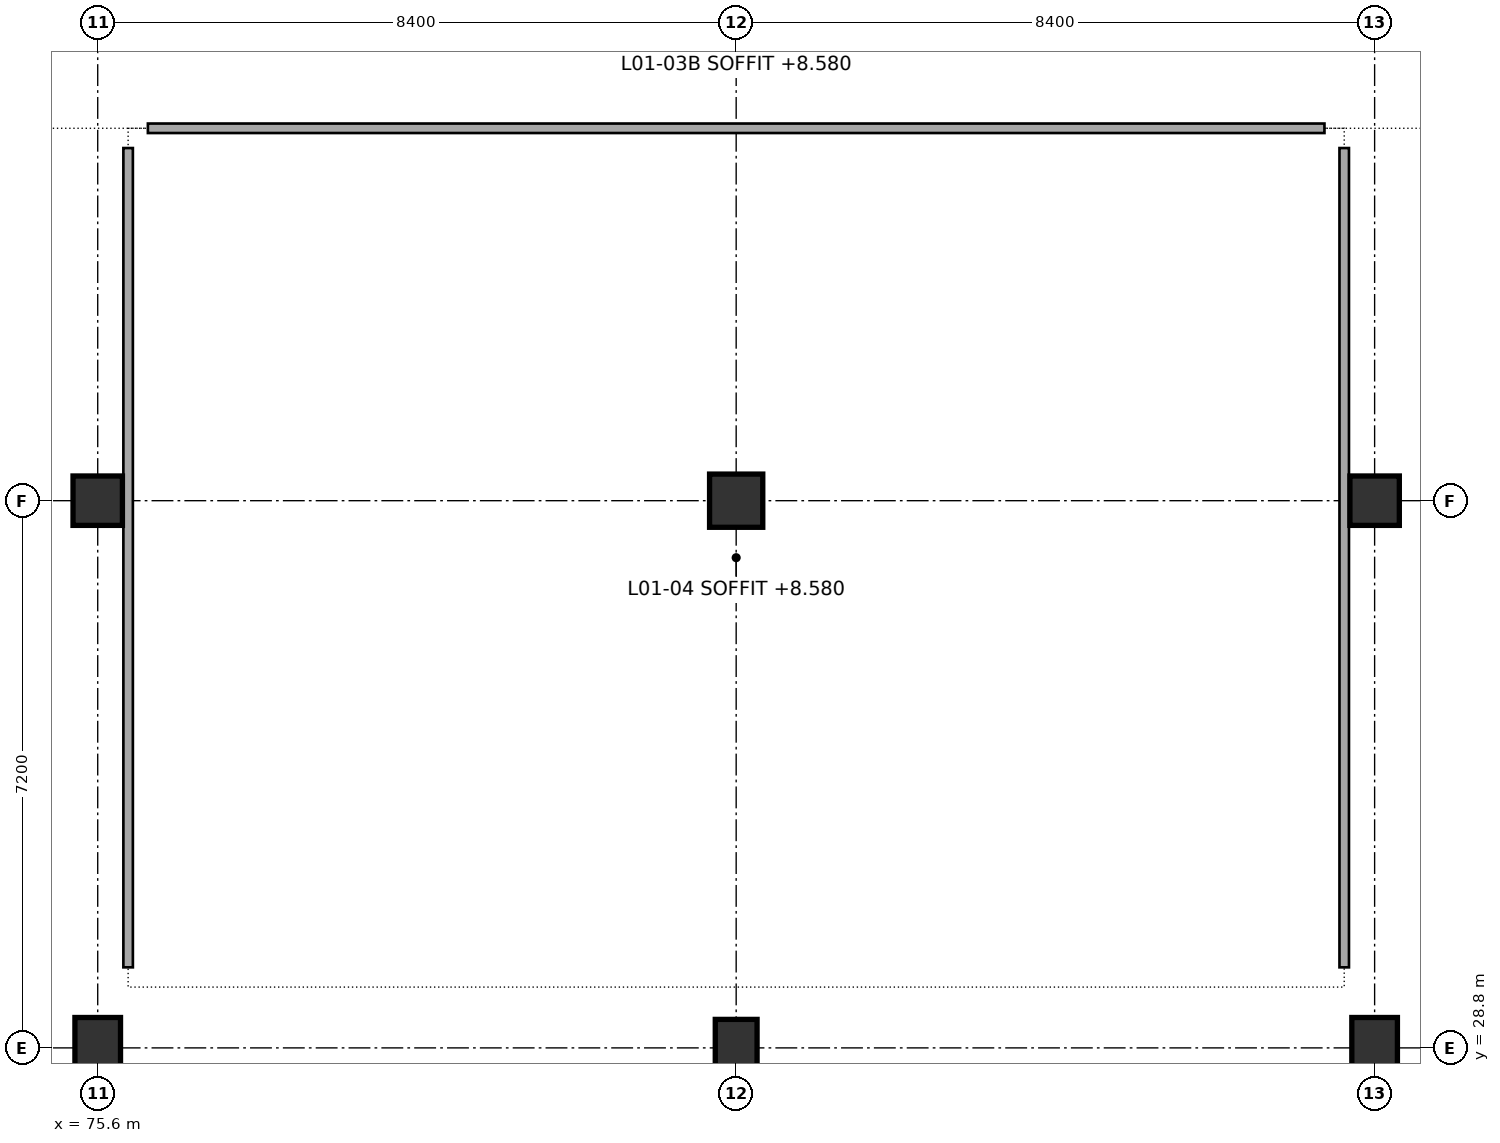
"""IFC4 building model, lengths in metres.
Left out: names, types, materials, properties, quantities, classifications, styles, units other than length and angle.
Written with IfcOpenShell. Run it as: python <this file> out.ifc"""

import sys

from ifc_helpers import new_model, si_unit, direction, frame, frame_2d, origin, origin_2d, place, context, subcontext, project, spatial, rectangle, extrude, element, fill, save


model = new_model("IFC4")
c1 = context("Model", 3, precision=1e-05, world=origin(), true_north=direction((0.0, 1.0)))
c2 = subcontext(c1, "Body", "Model", "MODEL_VIEW")
j1 = project(units=[si_unit("LENGTHUNIT", "METRE"), si_unit("PLANEANGLEUNIT", "RADIAN")], contexts=[c1])
p1 = place(None, origin())
s1 = spatial("IfcSite", under=j1, at=p1, CompositionType="ELEMENT")
p2 = place(p1, origin())
s2 = spatial("IfcBuilding", under=s1, at=p2, CompositionType="ELEMENT")
p3 = place(p2, frame((0.0, 0.0, 4.8)))
s3 = spatial("IfcBuildingStorey", under=s2, at=p3, CompositionType="ELEMENT", Elevation=4.8)
p4 = place(p3, frame((75.6, 28.8, 0.0), z_axis=(0.0, 0.0, 1.0), x_axis=(1.0, 0.0, 0.0)))
e1 = element("IfcColumn", 1, at=p4, inside=s3, PredefinedType="COLUMN", context=c2, shape_type="SweptSolid", body=[
    extrude(rectangle(XDim=0.6, YDim=0.8, at=origin_2d()), origin(), (0.0, 0.0, 1.0), 4.2),
])
p5 = place(p3, frame((75.6, 36.0, 0.0), z_axis=(0.0, 0.0, 1.0), x_axis=(1.0, 0.0, 0.0)))
e2 = element("IfcColumn", 2, at=p5, inside=s3, PredefinedType="COLUMN", context=c2, shape_type="SweptSolid", body=[
    extrude(rectangle(XDim=0.65, YDim=0.65, at=origin_2d()), origin(), (0.0, 0.0, 1.0), 4.2),
])
p6 = place(p3, frame((84.0, 28.8, 0.0), z_axis=(0.0, 0.0, 1.0), x_axis=(1.0, 0.0, 0.0)))
e3 = element("IfcColumn", 3, at=p6, inside=s3, PredefinedType="COLUMN", context=c2, shape_type="SweptSolid", body=[
    extrude(rectangle(XDim=0.55, YDim=0.75, at=origin_2d()), origin(), (0.0, 0.0, 1.0), 4.2),
])
p7 = place(p3, frame((84.0, 36.0, 0.0), z_axis=(0.0, 0.0, 1.0), x_axis=(1.0, 0.0, 0.0)))
e4 = element("IfcColumn", 4, at=p7, inside=s3, PredefinedType="COLUMN", context=c2, shape_type="SweptSolid", body=[
    extrude(rectangle(XDim=0.7, YDim=0.7, at=origin_2d()), origin(), (0.0, 0.0, 1.0), 4.2),
])
p8 = place(p3, frame((92.4, 28.8, 0.0), z_axis=(0.0, 0.0, 1.0), x_axis=(1.0, 0.0, 0.0)))
e5 = element("IfcColumn", 5, at=p8, inside=s3, PredefinedType="COLUMN", context=c2, shape_type="SweptSolid", body=[
    extrude(rectangle(XDim=0.6, YDim=0.8, at=origin_2d()), origin(), (0.0, 0.0, 1.0), 4.2),
])
p9 = place(p3, frame((92.4, 36.0, 0.0), z_axis=(0.0, 0.0, 1.0), x_axis=(1.0, 0.0, 0.0)))
e6 = element("IfcColumn", 6, at=p9, inside=s3, PredefinedType="COLUMN", context=c2, shape_type="SweptSolid", body=[
    extrude(rectangle(XDim=0.65, YDim=0.65, at=origin_2d()), origin(), (0.0, 0.0, 1.0), 4.2),
])
p10 = place(p3, frame((92.0, 29.86, 0.0), z_axis=(0.0, 0.0, 1.0), x_axis=(0.0, 1.0, 0.0)))
e7 = element("IfcWall", 7, at=p10, inside=s3, PredefinedType="PARTITIONING", context=c2, shape_type="SweptSolid", body=[
    extrude(rectangle(XDim=10.78, YDim=0.125, at=frame_2d((5.39, 0.0))), origin(), (0.0, 0.0, 1.0), 2.765),
])
p11 = place(p3, frame((91.74, 40.9, 0.0), z_axis=(0.0, 0.0, 1.0), x_axis=(-1.0, 0.0, 0.0)))
e8 = element("IfcWall", 8, at=p11, inside=s3, PredefinedType="PARTITIONING", context=c2, shape_type="SweptSolid", body=[
    extrude(rectangle(XDim=15.48, YDim=0.125, at=frame_2d((7.74, 0.0))), origin(), (0.0, 0.0, 1.0), 3.84),
])
p12 = place(p11, frame((6.89, 0.0, 0.0)))
e9 = element("IfcOpeningElement", 9, at=p12, cuts=e8, PredefinedType="OPENING", context=c2, shape_type="SweptSolid", body=[
    extrude(rectangle(XDim=1.7, YDim=2.2, at=frame_2d((0.85, 1.1))), frame((0.0, 0.073, 0.0), z_axis=(0.0, -1.0, 0.0), x_axis=(1.0, 0.0, 0.0)), (0.0, 0.0, 1.0), 0.145),
])
p13 = place(p3, frame((76.0, 40.64, 0.0), z_axis=(0.0, 0.0, 1.0), x_axis=(0.0, -1.0, 0.0)))
e10 = element("IfcWall", 10, at=p13, inside=s3, PredefinedType="PARTITIONING", context=c2, shape_type="SweptSolid", body=[
    extrude(rectangle(XDim=10.78, YDim=0.125, at=frame_2d((5.39, 0.0))), origin(), (0.0, 0.0, 1.0), 2.865),
])
p14 = place(p12, origin())
e11 = element("IfcDoor", 11, at=p14, inside=s3, OperationType="DOUBLE_DOOR_SINGLE_SWING", PredefinedType="DOOR", context=c2, shape_type="SweptSolid", body=[
    extrude(rectangle(XDim=1.7, YDim=2.2, at=frame_2d((0.85, 1.1))), frame((0.0, 0.025, 0.0), z_axis=(0.0, -1.0, 0.0), x_axis=(1.0, 0.0, 0.0)), (0.0, 0.0, 1.0), 0.05),
])
fill(e9, e11)
save(model, sys.argv[1])
